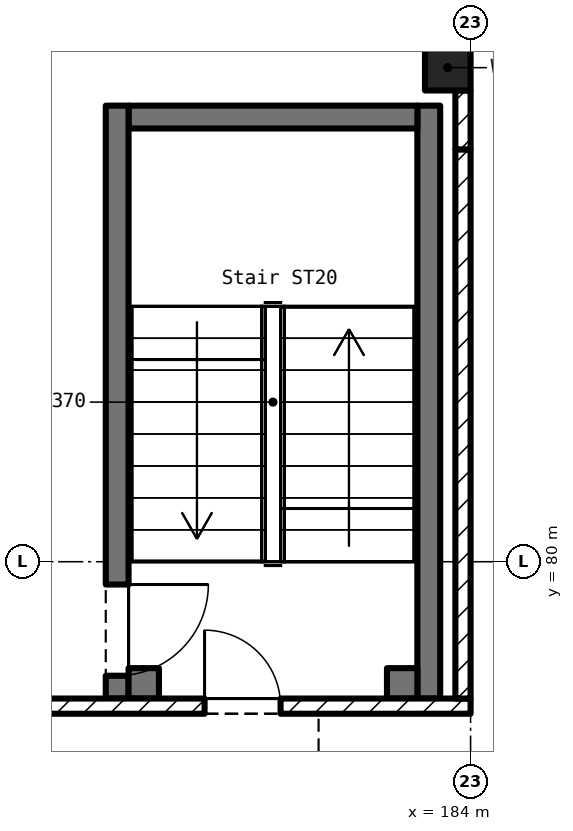
"""IFC4 building model, lengths in metres.
Left out: names, types, materials, properties, quantities, classifications, styles, units other than length and angle.
Written with IfcOpenShell. Run it as: python <this file> out.ifc"""

import sys

from ifc_helpers import new_model, si_unit, direction, frame, frame_2d, origin, origin_2d, place, context, subcontext, project, spatial, rectangle, extrude, element, fill, save


model = new_model("IFC4")
c1 = context("Model", 3, precision=1e-05, world=origin(), true_north=direction((0.0, 1.0)))
c2 = subcontext(c1, "Body", "Model", "MODEL_VIEW")
j1 = project(units=[si_unit("LENGTHUNIT", "METRE"), si_unit("PLANEANGLEUNIT", "RADIAN")], contexts=[c1])
p1 = place(None, origin())
s1 = spatial("IfcSite", under=j1, at=p1, CompositionType="ELEMENT")
p2 = place(p1, origin())
s2 = spatial("IfcBuilding", under=s1, at=p2, CompositionType="ELEMENT")
p3 = place(p2, origin())
s3 = spatial("IfcBuildingStorey", under=s2, at=p3, CompositionType="ELEMENT", Elevation=0.0)
p4 = place(p3, frame((183.7, 86.5, 0.0), z_axis=(0.0, 0.0, 1.0), x_axis=(1.0, 0.0, 0.0)))
e1 = element("IfcColumn", 1, at=p4, inside=s3, PredefinedType="COLUMN", context=c2, shape_type="SweptSolid", body=[
    extrude(rectangle(XDim=0.6, YDim=0.6, at=origin_2d()), origin(), (0.0, 0.0, 1.0), 6.0),
])
p5 = place(p3, frame((181.85, 70.0, -0.05), z_axis=(0.0, 0.0, 1.0), x_axis=(0.0, 1.0, 0.0)))
e2 = element("IfcWall", 2, at=p5, inside=s3, PredefinedType="SHEAR", context=c2, shape_type="SweptSolid", body=[
    extrude(rectangle(XDim=8.0, YDim=0.3, at=frame_2d((4.0, 0.0))), origin(), (0.0, 0.0, 1.0), 0.9),
])
p6 = place(p3, frame((176.1, 78.1, 0.0), z_axis=(0.0, 0.0, 1.0), x_axis=(1.0, 0.0, 0.0)))
e3 = element("IfcWall", 3, at=p6, inside=s3, PredefinedType="SOLIDWALL", context=c2, shape_type="SweptSolid", body=[
    extrude(rectangle(XDim=7.9, YDim=0.2, at=frame_2d((3.95, 0.0))), origin(), (0.0, 0.0, 1.0), 5.05),
])
p7 = place(p6, frame((0.4, 0.0, 0.0)))
e4 = element("IfcOpeningElement", 4, at=p7, cuts=e3, PredefinedType="OPENING", context=c2, shape_type="SweptSolid", body=[
    extrude(rectangle(XDim=1.0, YDim=2.1, at=frame_2d((0.5, 1.05))), frame((0.0, 0.112, 0.0), z_axis=(0.0, -1.0, 0.0), x_axis=(1.0, 0.0, 0.0)), (0.0, 0.0, 1.0), 0.224),
])
p8 = place(p6, frame((4.4, 0.0, 0.0)))
e5 = element("IfcOpeningElement", 5, at=p8, cuts=e3, PredefinedType="OPENING", context=c2, shape_type="SweptSolid", body=[
    extrude(rectangle(XDim=1.0, YDim=2.1, at=frame_2d((0.5, 1.05))), frame((0.0, 0.112, 0.0), z_axis=(0.0, -1.0, 0.0), x_axis=(1.0, 0.0, 0.0)), (0.0, 0.0, 1.0), 0.224),
])
p9 = place(p3, frame((183.9, 78.2, 0.0), z_axis=(0.0, 0.0, 1.0), x_axis=(0.0, 1.0, 0.0)))
e6 = element("IfcWall", 6, at=p9, inside=s3, PredefinedType="SOLIDWALL", context=c2, shape_type="SweptSolid", body=[
    extrude(rectangle(XDim=7.225, YDim=0.2, at=frame_2d((3.613, 0.0))), origin(), (0.0, 0.0, 1.0), 5.05),
])
p10 = place(p3, frame((183.9, 85.425, 0.0), z_axis=(0.0, 0.0, 1.0), x_axis=(0.0, 1.0, 0.0)))
e7 = element("IfcWall", 7, at=p10, inside=s3, PredefinedType="SOLIDWALL", context=c2, shape_type="SweptSolid", body=[
    extrude(rectangle(XDim=0.775, YDim=0.2, at=frame_2d((0.387, 0.0))), origin(), (0.0, 0.0, 1.0), 5.05),
])
p11 = place(p3, frame((183.45, 78.2, 0.0), z_axis=(0.0, 0.0, 1.0), x_axis=(0.0, 1.0, 0.0)))
e8 = element("IfcWall", 8, at=p11, inside=s3, PredefinedType="SOLIDWALL", context=c2, shape_type="SweptSolid", body=[
    extrude(rectangle(XDim=7.8, YDim=0.3, at=frame_2d((3.9, 0.0))), origin(), (0.0, 0.0, 1.0), 6.0),
])
p12 = place(p3, frame((183.3, 85.85, 0.0), z_axis=(0.0, 0.0, 1.0), x_axis=(-1.0, 0.0, 0.0)))
e9 = element("IfcWall", 9, at=p12, inside=s3, PredefinedType="SOLIDWALL", context=c2, shape_type="SweptSolid", body=[
    extrude(rectangle(XDim=3.8, YDim=0.3, at=frame_2d((1.9, 0.0))), origin(), (0.0, 0.0, 1.0), 6.0),
])
p13 = place(p3, frame((179.35, 86.0, 0.0), z_axis=(0.0, 0.0, 1.0), x_axis=(0.0, -1.0, 0.0)))
e10 = element("IfcWall", 10, at=p13, inside=s3, PredefinedType="SOLIDWALL", context=c2, shape_type="SweptSolid", body=[
    extrude(rectangle(XDim=7.8, YDim=0.3, at=frame_2d((3.9, 0.0))), origin(), (0.0, 0.0, 1.0), 6.0),
])
p14 = place(p13, frame((6.3, 0.0, 0.0)))
e11 = element("IfcOpeningElement", 11, at=p14, cuts=e10, PredefinedType="OPENING", context=c2, shape_type="SweptSolid", body=[
    extrude(rectangle(XDim=1.2, YDim=2.1, at=frame_2d((0.6, 1.05))), frame((0.0, 0.162, 0.0), z_axis=(0.0, -1.0, 0.0), x_axis=(1.0, 0.0, 0.0)), (0.0, 0.0, 1.0), 0.324),
])
p15 = place(p3, frame((179.5, 78.4, 0.0), z_axis=(0.0, 0.0, 1.0), x_axis=(1.0, 0.0, 0.0)))
e12 = element("IfcWall", 12, at=p15, inside=s3, PredefinedType="SOLIDWALL", context=c2, shape_type="SweptSolid", body=[
    extrude(rectangle(XDim=0.4, YDim=0.4, at=frame_2d((0.2, 0.0))), origin(), (0.0, 0.0, 1.0), 6.0),
])
p16 = place(p3, frame((182.9, 78.4, 0.0), z_axis=(0.0, 0.0, 1.0), x_axis=(1.0, 0.0, 0.0)))
e13 = element("IfcWall", 13, at=p16, inside=s3, PredefinedType="SOLIDWALL", context=c2, shape_type="SweptSolid", body=[
    extrude(rectangle(XDim=0.4, YDim=0.4, at=frame_2d((0.2, 0.0))), origin(), (0.0, 0.0, 1.0), 6.0),
])
p17 = place(p8, origin())
e14 = element("IfcDoor", 14, at=p17, inside=s3, OperationType="SINGLE_SWING_LEFT", PredefinedType="DOOR", context=c2, shape_type="SweptSolid", body=[
    extrude(rectangle(XDim=1.0, YDim=2.1, at=frame_2d((0.5, 1.05))), frame((0.0, 0.025, 0.0), z_axis=(0.0, -1.0, 0.0), x_axis=(1.0, 0.0, 0.0)), (0.0, 0.0, 1.0), 0.05),
])
fill(e5, e14)
p18 = place(p14, origin())
e15 = element("IfcDoor", 15, at=p18, inside=s3, OperationType="SINGLE_SWING_LEFT", PredefinedType="DOOR", context=c2, shape_type="SweptSolid", body=[
    extrude(rectangle(XDim=1.2, YDim=2.1, at=frame_2d((0.6, 1.05))), frame((0.0, 0.025, 0.0), z_axis=(0.0, -1.0, 0.0), x_axis=(1.0, 0.0, 0.0)), (0.0, 0.0, 1.0), 0.05),
])
fill(e11, e15)
save(model, sys.argv[1])
